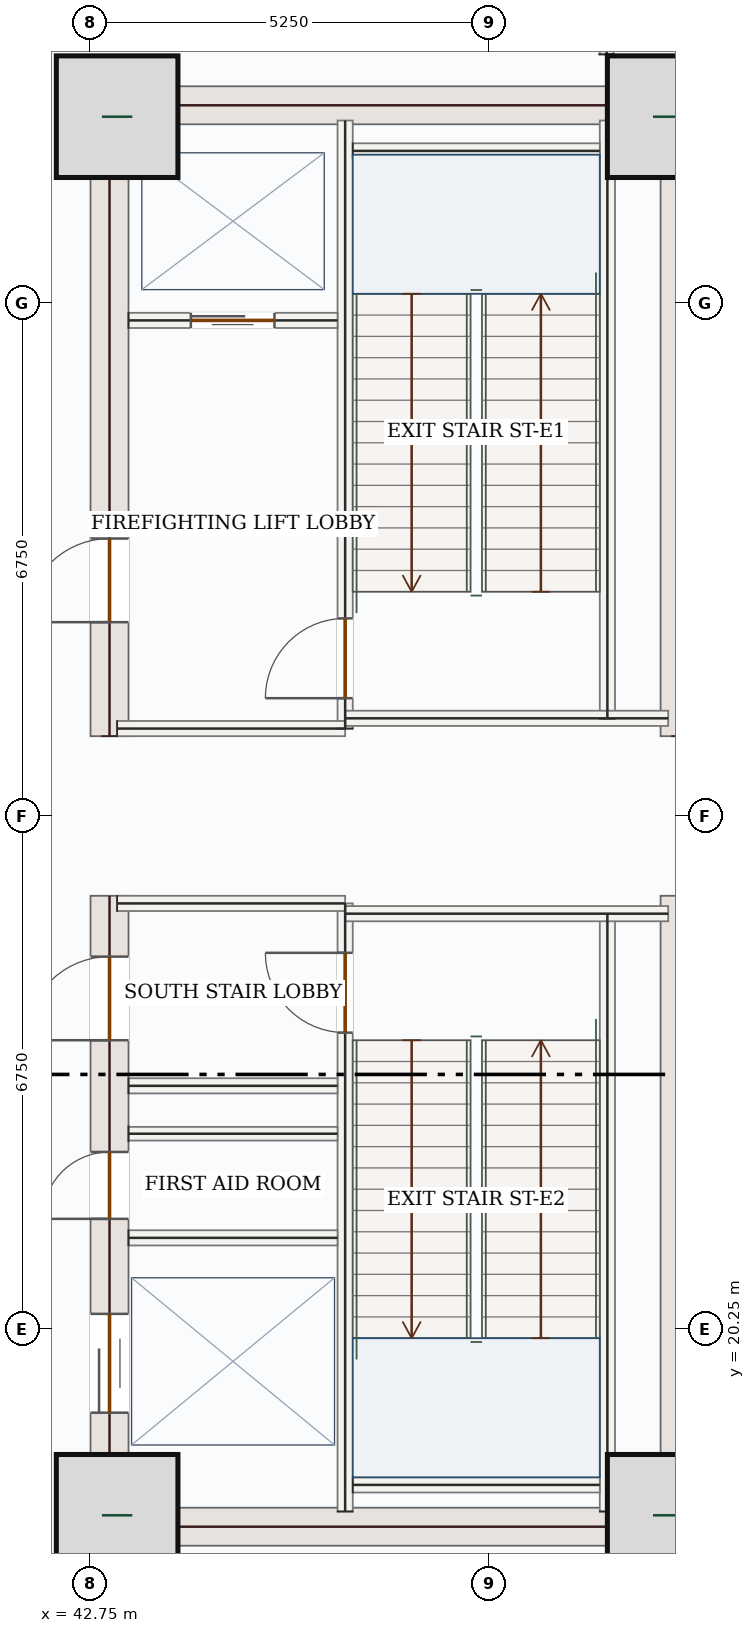
"""IFC4 building model, lengths in metres.
Left out: names, types, materials, properties, quantities, classifications, styles, units other than length and angle.
Written with IfcOpenShell. Run it as: python <this file> out.ifc"""

import sys

from ifc_helpers import new_model, si_unit, direction, frame, frame_2d, origin, origin_2d, place, context, subcontext, project, spatial, rectangle, extrude, source, transform, mapped, element, fill, save


model = new_model("IFC4")
c1 = context("Model", 3, precision=1e-05, world=origin(), true_north=direction((0.0, 1.0)))
c2 = subcontext(c1, "Body", "Model", "MODEL_VIEW")
j1 = project(units=[si_unit("LENGTHUNIT", "METRE"), si_unit("PLANEANGLEUNIT", "RADIAN")], contexts=[c1])
p1 = place(None, origin())
s1 = spatial("IfcSite", under=j1, at=p1, CompositionType="ELEMENT")
p2 = place(p1, origin())
s2 = spatial("IfcBuilding", under=s1, at=p2, CompositionType="ELEMENT")
p3 = place(p2, frame((0.0, 0.0, -5.4)))
s3 = spatial("IfcBuildingStorey", under=s2, at=p3, CompositionType="ELEMENT", Elevation=-5.4)
p4 = place(p3, frame((43.0, 17.4, 0.0), z_axis=(0.0, 0.0, 1.0), x_axis=(0.0, 1.0, 0.0)))
e1 = element("IfcWall", 1, at=p4, inside=s3, PredefinedType="SHEAR", context=c2, shape_type="SweptSolid", body=[
    extrude(rectangle(XDim=8.55, YDim=0.5, at=frame_2d((4.275, 0.0))), origin(), (0.0, 0.0, 1.0), 4.95),
])
p5 = place(p4, frame((6.65, 0.0, 0.0)))
e2 = element("IfcOpeningElement", 2, at=p5, cuts=e1, PredefinedType="OPENING", context=c2, shape_type="SweptSolid", body=[
    extrude(rectangle(XDim=1.1, YDim=2.2, at=frame_2d((0.55, 1.1))), frame((0.0, 0.26, 0.0), z_axis=(0.0, -1.0, 0.0), x_axis=(1.0, 0.0, 0.0)), (0.0, 0.0, 1.0), 0.52),
])
p6 = place(p4, frame((1.75, 0.0, 0.0)))
e3 = element("IfcOpeningElement", 3, at=p6, cuts=e1, PredefinedType="OPENING", context=c2, shape_type="SweptSolid", body=[
    extrude(rectangle(XDim=1.3, YDim=2.2, at=frame_2d((0.65, 1.1))), frame((0.0, 0.26, 0.0), z_axis=(0.0, -1.0, 0.0), x_axis=(1.0, 0.0, 0.0)), (0.0, 0.0, 1.0), 0.52),
])
p7 = place(p4, frame((4.3, 0.0, 0.0)))
e4 = element("IfcOpeningElement", 4, at=p7, cuts=e1, PredefinedType="OPENING", context=c2, shape_type="SweptSolid", body=[
    extrude(rectangle(XDim=0.88, YDim=2.1, at=frame_2d((0.44, 1.05))), frame((0.0, 0.26, 0.0), z_axis=(0.0, -1.0, 0.0), x_axis=(1.0, 0.0, 0.0)), (0.0, 0.0, 1.0), 0.52),
])
p8 = place(p3, frame((43.0, 28.05, 0.0), z_axis=(0.0, 0.0, 1.0), x_axis=(0.0, 1.0, 0.0)))
e5 = element("IfcWall", 5, at=p8, inside=s3, PredefinedType="SHEAR", context=c2, shape_type="SweptSolid", body=[
    extrude(rectangle(XDim=8.55, YDim=0.5, at=frame_2d((4.275, 0.0))), origin(), (0.0, 0.0, 1.0), 4.95),
])
p9 = place(p8, frame((1.5, 0.0, 0.0)))
e6 = element("IfcOpeningElement", 6, at=p9, cuts=e5, PredefinedType="OPENING", context=c2, shape_type="SweptSolid", body=[
    extrude(rectangle(XDim=1.1, YDim=2.2, at=frame_2d((0.55, 1.1))), frame((0.0, 0.26, 0.0), z_axis=(0.0, -1.0, 0.0), x_axis=(1.0, 0.0, 0.0)), (0.0, 0.0, 1.0), 0.52),
])
m1 = source(origin(), c2, "Body", "SweptSolid", [
    extrude(rectangle(XDim=8.55, YDim=0.5, at=frame_2d((4.275, 0.0))), origin(), (0.0, 0.0, 1.0), 4.95),
])
for number, where, z_axis, x_axis in (
    (7, (50.5, 17.4, 0.0), (0.0, 0.0, 1.0), (0.0, 1.0, 0.0)),
    (8, (50.5, 28.05, 0.0), (0.0, 0.0, 1.0), (0.0, 1.0, 0.0)),
):
    element("IfcWall", number, at=place(p3, frame(where, z_axis=z_axis, x_axis=x_axis)), inside=s3, PredefinedType="SHEAR", context=c2, shape_type="MappedRepresentation", body=[
        mapped(m1, transform((0.0, 0.0, 0.0), x_axis=(1.0, 0.0, 0.0), y_axis=(0.0, 1.0, 0.0), z_axis=(0.0, 0.0, 1.0), scale=1.0)),
    ])
m2 = source(origin(), c2, "Body", "SweptSolid", [
    extrude(rectangle(XDim=7.0, YDim=0.5, at=frame_2d((3.5, 0.0))), origin(), (0.0, 0.0, 1.0), 4.95),
])
for number, where, z_axis, x_axis in (
    (9, (43.25, 17.65, 0.0), (0.0, 0.0, 1.0), (1.0, 0.0, 0.0)),
    (10, (43.25, 36.35, 0.0), (0.0, 0.0, 1.0), (1.0, 0.0, 0.0)),
):
    element("IfcWall", number, at=place(p3, frame(where, z_axis=z_axis, x_axis=x_axis)), inside=s3, PredefinedType="SHEAR", context=c2, shape_type="MappedRepresentation", body=[
        mapped(m2, transform((0.0, 0.0, 0.0), x_axis=(1.0, 0.0, 0.0), y_axis=(0.0, 1.0, 0.0), z_axis=(0.0, 0.0, 1.0), scale=1.0)),
    ])
m3 = source(origin(), c2, "Body", "SweptSolid", [
    extrude(rectangle(XDim=1.6, YDim=1.6, at=origin_2d()), origin(), (0.0, 0.0, 1.0), 5.4),
])
for number, where, z_axis, x_axis in (
    (11, (43.1, 17.8, 0.0), (0.0, 0.0, 1.0), (1.0, 0.0, 0.0)),
    (12, (50.35, 17.8, 0.0), (0.0, 0.0, 1.0), (1.0, 0.0, 0.0)),
    (13, (43.1, 36.2, 0.0), (0.0, 0.0, 1.0), (1.0, 0.0, 0.0)),
    (14, (50.35, 36.2, 0.0), (0.0, 0.0, 1.0), (1.0, 0.0, 0.0)),
):
    element("IfcColumn", number, at=place(p3, frame(where, z_axis=z_axis, x_axis=x_axis)), inside=s3, PredefinedType="COLUMN", context=c2, shape_type="MappedRepresentation", body=[
        mapped(m3, transform((0.0, 0.0, 0.0), x_axis=(1.0, 0.0, 0.0), y_axis=(0.0, 1.0, 0.0), z_axis=(0.0, 0.0, 1.0), scale=1.0)),
    ])
m4 = source(origin(), c2, "Body", "SweptSolid", [
    extrude(rectangle(XDim=7.87, YDim=0.2, at=frame_2d((3.935, 0.0))), origin(), (0.0, 0.0, 1.0), 4.95),
])
for number, where, z_axis, x_axis in (
    (15, (49.55, 17.85, 0.0), (0.0, 0.0, 1.0), (0.0, 1.0, 0.0)),
    (16, (49.55, 28.28, 0.0), (0.0, 0.0, 1.0), (0.0, 1.0, 0.0)),
):
    element("IfcWall", number, at=place(p3, frame(where, z_axis=z_axis, x_axis=x_axis)), inside=s3, PredefinedType="SOLIDWALL", context=c2, shape_type="MappedRepresentation", body=[
        mapped(m4, transform((0.0, 0.0, 0.0), x_axis=(1.0, 0.0, 0.0), y_axis=(0.0, 1.0, 0.0), z_axis=(0.0, 0.0, 1.0), scale=1.0)),
    ])
p10 = place(p3, frame((46.1, 17.85, 0.0), z_axis=(0.0, 0.0, 1.0), x_axis=(0.0, 1.0, 0.0)))
e17 = element("IfcWall", 17, at=p10, inside=s3, PredefinedType="SOLIDWALL", context=c2, shape_type="SweptSolid", body=[
    extrude(rectangle(XDim=8.0, YDim=0.2, at=frame_2d((4.0, 0.0))), origin(), (0.0, 0.0, 1.0), 4.95),
])
p11 = place(p10, frame((6.3, 0.0, 0.0)))
e18 = element("IfcOpeningElement", 18, at=p11, cuts=e17, PredefinedType="OPENING", context=c2, shape_type="SweptSolid", body=[
    extrude(rectangle(XDim=1.05, YDim=2.15, at=frame_2d((0.525, 1.075))), frame((0.0, 0.11, 0.0), z_axis=(0.0, -1.0, 0.0), x_axis=(1.0, 0.0, 0.0)), (0.0, 0.0, 1.0), 0.22),
])
p12 = place(p3, frame((46.1, 28.15, 0.0), z_axis=(0.0, 0.0, 1.0), x_axis=(0.0, 1.0, 0.0)))
e19 = element("IfcWall", 19, at=p12, inside=s3, PredefinedType="SOLIDWALL", context=c2, shape_type="SweptSolid", body=[
    extrude(rectangle(XDim=8.0, YDim=0.2, at=frame_2d((4.0, 0.0))), origin(), (0.0, 0.0, 1.0), 4.95),
])
p13 = place(p12, frame((0.4, 0.0, 0.0)))
e20 = element("IfcOpeningElement", 20, at=p13, cuts=e19, PredefinedType="OPENING", context=c2, shape_type="SweptSolid", body=[
    extrude(rectangle(XDim=1.05, YDim=2.15, at=frame_2d((0.525, 1.075))), frame((0.0, 0.11, 0.0), z_axis=(0.0, -1.0, 0.0), x_axis=(1.0, 0.0, 0.0)), (0.0, 0.0, 1.0), 0.22),
])
m5 = source(origin(), c2, "Body", "SweptSolid", [
    extrude(rectangle(XDim=3.0, YDim=0.2, at=frame_2d((1.5, 0.0))), origin(), (0.0, 0.0, 1.0), 4.95),
])
p14 = place(p3, frame((43.1, 25.85, 0.0), z_axis=(0.0, 0.0, 1.0), x_axis=(1.0, 0.0, 0.0)))
e21 = element("IfcWall", 21, at=p14, inside=s3, PredefinedType="SOLIDWALL", context=c2, shape_type="MappedRepresentation", body=[
    mapped(m5, transform((0.0, 0.0, 0.0), x_axis=(1.0, 0.0, 0.0), y_axis=(0.0, 1.0, 0.0), z_axis=(0.0, 0.0, 1.0), scale=1.0)),
])
m6 = source(origin(), c2, "Body", "SweptSolid", [
    extrude(rectangle(XDim=4.25, YDim=0.2, at=frame_2d((2.125, 0.0))), origin(), (0.0, 0.0, 1.0), 4.95),
])
p15 = place(p3, frame((46.1, 25.715, 0.0), z_axis=(0.0, 0.0, 1.0), x_axis=(1.0, 0.0, 0.0)))
e22 = element("IfcWall", 22, at=p15, inside=s3, PredefinedType="SOLIDWALL", context=c2, shape_type="MappedRepresentation", body=[
    mapped(m6, transform((0.0, 0.0, 0.0), x_axis=(1.0, 0.0, 0.0), y_axis=(0.0, 1.0, 0.0), z_axis=(0.0, 0.0, 1.0), scale=1.0)),
])
p16 = place(p3, frame((43.1, 28.15, 0.0), z_axis=(0.0, 0.0, 1.0), x_axis=(1.0, 0.0, 0.0)))
e23 = element("IfcWall", 23, at=p16, inside=s3, PredefinedType="SOLIDWALL", context=c2, shape_type="MappedRepresentation", body=[
    mapped(m5, transform((0.0, 0.0, 0.0), x_axis=(1.0, 0.0, 0.0), y_axis=(0.0, 1.0, 0.0), z_axis=(0.0, 0.0, 1.0), scale=1.0)),
])
p17 = place(p3, frame((46.1, 28.285, 0.0), z_axis=(0.0, 0.0, 1.0), x_axis=(1.0, 0.0, 0.0)))
e24 = element("IfcWall", 24, at=p17, inside=s3, PredefinedType="SOLIDWALL", context=c2, shape_type="MappedRepresentation", body=[
    mapped(m6, transform((0.0, 0.0, 0.0), x_axis=(1.0, 0.0, 0.0), y_axis=(0.0, 1.0, 0.0), z_axis=(0.0, 0.0, 1.0), scale=1.0)),
])
m7 = source(origin(), c2, "Body", "SweptSolid", [
    extrude(rectangle(XDim=3.25, YDim=0.2, at=frame_2d((1.625, 0.0))), origin(), (0.0, 0.0, 1.0), 4.95),
])
for number, where, z_axis, x_axis in (
    (25, (46.2, 35.75, 0.0), (0.0, 0.0, 1.0), (1.0, 0.0, 0.0)),
    (26, (46.2, 18.2, 0.0), (0.0, 0.0, 1.0), (1.0, 0.0, 0.0)),
):
    element("IfcWall", number, at=place(p3, frame(where, z_axis=z_axis, x_axis=x_axis)), inside=s3, PredefinedType="SOLIDWALL", context=c2, shape_type="MappedRepresentation", body=[
        mapped(m7, transform((0.0, 0.0, 0.0), x_axis=(1.0, 0.0, 0.0), y_axis=(0.0, 1.0, 0.0), z_axis=(0.0, 0.0, 1.0), scale=1.0)),
    ])
p18 = place(p3, frame((43.25, 33.52, 0.0), z_axis=(0.0, 0.0, 1.0), x_axis=(1.0, 0.0, 0.0)))
e27 = element("IfcWall", 27, at=p18, inside=s3, PredefinedType="SOLIDWALL", context=c2, shape_type="SweptSolid", body=[
    extrude(rectangle(XDim=2.75, YDim=0.2, at=frame_2d((1.375, 0.0))), origin(), (0.0, 0.0, 1.0), 4.95),
])
p19 = place(p18, frame((0.82, 0.0, 0.0)))
e28 = element("IfcOpeningElement", 28, at=p19, cuts=e27, PredefinedType="OPENING", context=c2, shape_type="SweptSolid", body=[
    extrude(rectangle(XDim=1.1, YDim=2.15, at=frame_2d((0.55, 1.075))), frame((0.0, 0.11, 0.0), z_axis=(0.0, -1.0, 0.0), x_axis=(1.0, 0.0, 0.0)), (0.0, 0.0, 1.0), 0.22),
])
m8 = source(origin(), c2, "Body", "SweptSolid", [
    extrude(rectangle(XDim=2.75, YDim=0.2, at=frame_2d((1.375, 0.0))), origin(), (0.0, 0.0, 1.0), 4.95),
])
for number, where, z_axis, x_axis in (
    (29, (43.25, 23.45, 0.0), (0.0, 0.0, 1.0), (1.0, 0.0, 0.0)),
    (30, (43.25, 21.45, 0.0), (0.0, 0.0, 1.0), (1.0, 0.0, 0.0)),
):
    element("IfcWall", number, at=place(p3, frame(where, z_axis=z_axis, x_axis=x_axis)), inside=s3, PredefinedType="SOLIDWALL", context=c2, shape_type="MappedRepresentation", body=[
        mapped(m8, transform((0.0, 0.0, 0.0), x_axis=(1.0, 0.0, 0.0), y_axis=(0.0, 1.0, 0.0), z_axis=(0.0, 0.0, 1.0), scale=1.0)),
    ])
m9 = source(origin(), c2, "Body", "SweptSolid", [
    extrude(rectangle(XDim=2.75, YDim=0.18, at=frame_2d((1.375, 0.0))), origin(), (0.0, 0.0, 1.0), 4.95),
])
p20 = place(p3, frame((43.25, 22.82, 0.0), z_axis=(0.0, 0.0, 1.0), x_axis=(1.0, 0.0, 0.0)))
e31 = element("IfcWall", 31, at=p20, inside=s3, PredefinedType="PARTITIONING", context=c2, shape_type="MappedRepresentation", body=[
    mapped(m9, transform((0.0, 0.0, 0.0), x_axis=(1.0, 0.0, 0.0), y_axis=(0.0, 1.0, 0.0), z_axis=(0.0, 0.0, 1.0), scale=1.0)),
])
m10 = source(origin(), c2, "Body", "SweptSolid", [
    extrude(rectangle(XDim=1.824, YDim=0.18, at=frame_2d((0.912, 0.0))), origin(), (0.0, 0.0, 1.0), 4.95),
])
p21 = place(p3, frame((49.54, 37.02, 0.0), z_axis=(0.0, 0.0, 1.0), x_axis=(0.0, 1.0, 0.0)))
e32 = element("IfcWall", 32, at=p21, inside=s3, PredefinedType="PARTITIONING", context=c2, shape_type="MappedRepresentation", body=[
    mapped(m10, transform((0.0, 0.0, 0.0), x_axis=(1.0, 0.0, 0.0), y_axis=(0.0, 1.0, 0.0), z_axis=(0.0, 0.0, 1.0), scale=1.0)),
])
m11 = source(origin(), c2, "Body", "SweptSolid", [
    extrude(rectangle(XDim=1.05, YDim=2.15, at=frame_2d((0.525, 1.075))), frame((0.0, 0.025, 0.0), z_axis=(0.0, -1.0, 0.0), x_axis=(1.0, 0.0, 0.0)), (0.0, 0.0, 1.0), 0.05),
])
p22 = place(p13, origin())
e33 = element("IfcDoor", 33, at=p22, inside=s3, OperationType="SINGLE_SWING_LEFT", PredefinedType="DOOR", context=c2, shape_type="MappedRepresentation", body=[
    mapped(m11, transform((0.0, 0.0, 0.0), x_axis=(1.0, 0.0, 0.0), y_axis=(0.0, 1.0, 0.0), z_axis=(0.0, 0.0, 1.0), scale=1.0)),
])
fill(e20, e33)
p23 = place(p11, origin())
e34 = element("IfcDoor", 34, at=p23, inside=s3, OperationType="SINGLE_SWING_RIGHT", PredefinedType="DOOR", context=c2, shape_type="MappedRepresentation", body=[
    mapped(m11, transform((0.0, 0.0, 0.0), x_axis=(1.0, 0.0, 0.0), y_axis=(0.0, 1.0, 0.0), z_axis=(0.0, 0.0, 1.0), scale=1.0)),
])
fill(e18, e34)
m12 = source(origin(), c2, "Body", "SweptSolid", [
    extrude(rectangle(XDim=1.1, YDim=2.15, at=frame_2d((0.55, 1.075))), frame((0.0, 0.025, 0.0), z_axis=(0.0, -1.0, 0.0), x_axis=(1.0, 0.0, 0.0)), (0.0, 0.0, 1.0), 0.05),
])
p24 = place(p19, origin())
e35 = element("IfcDoor", 35, at=p24, inside=s3, OperationType="DOUBLE_DOOR_SLIDING", PredefinedType="DOOR", context=c2, shape_type="MappedRepresentation", body=[
    mapped(m12, transform((0.0, 0.0, 0.0), x_axis=(1.0, 0.0, 0.0), y_axis=(0.0, 1.0, 0.0), z_axis=(0.0, 0.0, 1.0), scale=1.0)),
])
fill(e28, e35)
m13 = source(origin(), c2, "Body", "SweptSolid", [
    extrude(rectangle(XDim=1.1, YDim=2.2, at=frame_2d((0.55, 1.1))), frame((0.0, 0.025, 0.0), z_axis=(0.0, -1.0, 0.0), x_axis=(1.0, 0.0, 0.0)), (0.0, 0.0, 1.0), 0.05),
])
p25 = place(p9, origin())
e36 = element("IfcDoor", 36, at=p25, inside=s3, OperationType="SINGLE_SWING_LEFT", PredefinedType="DOOR", context=c2, shape_type="MappedRepresentation", body=[
    mapped(m13, transform((0.0, 0.0, 0.0), x_axis=(1.0, 0.0, 0.0), y_axis=(0.0, 1.0, 0.0), z_axis=(0.0, 0.0, 1.0), scale=1.0)),
])
fill(e6, e36)
p26 = place(p5, origin())
e37 = element("IfcDoor", 37, at=p26, inside=s3, OperationType="SINGLE_SWING_LEFT", PredefinedType="DOOR", context=c2, shape_type="MappedRepresentation", body=[
    mapped(m13, transform((0.0, 0.0, 0.0), x_axis=(1.0, 0.0, 0.0), y_axis=(0.0, 1.0, 0.0), z_axis=(0.0, 0.0, 1.0), scale=1.0)),
])
fill(e2, e37)
m14 = source(origin(), c2, "Body", "SweptSolid", [
    extrude(rectangle(XDim=1.3, YDim=2.2, at=frame_2d((0.65, 1.1))), frame((0.0, 0.025, 0.0), z_axis=(0.0, -1.0, 0.0), x_axis=(1.0, 0.0, 0.0)), (0.0, 0.0, 1.0), 0.05),
])
p27 = place(p6, origin())
e38 = element("IfcDoor", 38, at=p27, inside=s3, OperationType="DOUBLE_DOOR_SLIDING", PredefinedType="DOOR", context=c2, shape_type="MappedRepresentation", body=[
    mapped(m14, transform((0.0, 0.0, 0.0), x_axis=(1.0, 0.0, 0.0), y_axis=(0.0, 1.0, 0.0), z_axis=(0.0, 0.0, 1.0), scale=1.0)),
])
fill(e3, e38)
m15 = source(origin(), c2, "Body", "SweptSolid", [
    extrude(rectangle(XDim=0.88, YDim=2.1, at=frame_2d((0.44, 1.05))), frame((0.0, 0.025, 0.0), z_axis=(0.0, -1.0, 0.0), x_axis=(1.0, 0.0, 0.0)), (0.0, 0.0, 1.0), 0.05),
])
p28 = place(p7, origin())
e39 = element("IfcDoor", 39, at=p28, inside=s3, OperationType="SINGLE_SWING_LEFT", PredefinedType="DOOR", context=c2, shape_type="MappedRepresentation", body=[
    mapped(m15, transform((0.0, 0.0, 0.0), x_axis=(1.0, 0.0, 0.0), y_axis=(0.0, 1.0, 0.0), z_axis=(0.0, 0.0, 1.0), scale=1.0)),
])
fill(e4, e39)
save(model, sys.argv[1])
